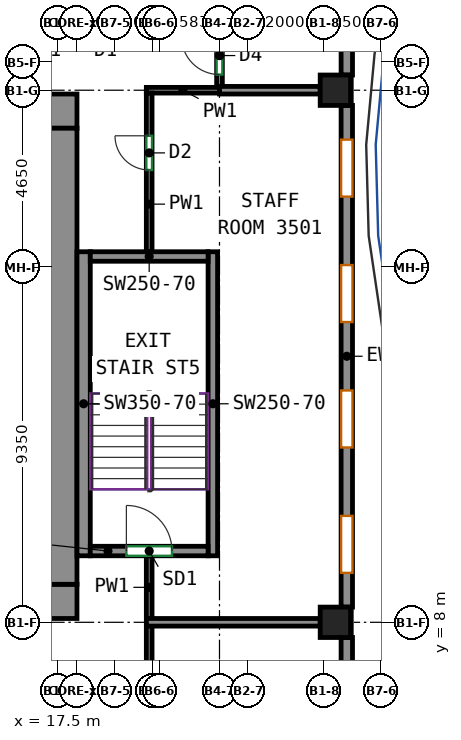
"""IFC4 building model, lengths in metres.
Left out: names, types, materials, properties, quantities, classifications, styles, units other than length and angle.
Written with IfcOpenShell. Run it as: python <this file> out.ifc"""

import sys

from ifc_helpers import new_model, si_unit, direction, frame, frame_2d, origin, origin_2d, place, context, subcontext, project, spatial, rectangle, extrude, source, transform, mapped, element, fill, save


model = new_model("IFC4")
c1 = context("Model", 3, precision=1e-05, world=origin(), true_north=direction((0.0, 1.0)))
c2 = subcontext(c1, "Body", "Model", "MODEL_VIEW")
j1 = project(units=[si_unit("LENGTHUNIT", "METRE"), si_unit("PLANEANGLEUNIT", "RADIAN")], contexts=[c1])
p1 = place(None, origin())
s1 = spatial("IfcSite", under=j1, at=p1, CompositionType="ELEMENT")
p2 = place(p1, origin())
s2 = spatial("IfcBuilding", under=s1, at=p2, CompositionType="ELEMENT")
p3 = place(p2, frame((0.0, 0.0, 154.1)))
s3 = spatial("IfcBuildingStorey", under=s2, at=p3, CompositionType="ELEMENT", Elevation=154.1)
m1 = source(origin(), c2, "Body", "SweptSolid", [
    extrude(rectangle(XDim=0.8, YDim=0.8, at=origin_2d()), origin(), (0.0, 0.0, 1.0), 3.12),
])
for number, where, z_axis, x_axis in (
    (1, (24.8, 8.0, 0.0), (0.0, 0.0, 1.0), (1.0, 0.0, 0.0)),
    (2, (24.8, 22.0, 0.0), (0.0, 0.0, 1.0), (1.0, 0.0, 0.0)),
):
    element("IfcColumn", number, at=place(p3, frame(where, z_axis=z_axis, x_axis=x_axis)), inside=s3, PredefinedType="COLUMN", context=c2, shape_type="MappedRepresentation", body=[
        mapped(m1, transform((0.0, 0.0, 0.0))),
    ])
m2 = source(origin(), c2, "Body", "SweptSolid", [
    extrude(rectangle(XDim=5.53, YDim=0.9, at=frame_2d((2.765, 0.0))), origin(), (0.0, 0.0, 1.0), 3.12),
])
p4 = place(p3, frame((12.47, 8.55, 0.0), z_axis=(0.0, 0.0, 1.0), x_axis=(1.0, 0.0, 0.0)))
e3 = element("IfcWall", 3, at=p4, inside=s3, PredefinedType="SHEAR", context=c2, shape_type="MappedRepresentation", body=[
    mapped(m2, transform((0.0, 0.0, 0.0))),
])
p5 = place(p4, frame((2.18, 0.0, 0.0)))
e4 = element("IfcOpeningElement", 4, at=p5, cuts=e3, PredefinedType="OPENING", context=c2, shape_type="SweptSolid", body=[
    extrude(rectangle(XDim=1.2, YDim=2.1, at=frame_2d((0.6, 1.05))), frame((0.0, 0.46, 0.0), z_axis=(0.0, -1.0, 0.0), x_axis=(1.0, 0.0, 0.0)), (0.0, 0.0, 1.0), 0.92),
])
m3 = source(origin(), c2, "Body", "SweptSolid", [
    extrude(rectangle(XDim=33.9, YDim=0.9, at=frame_2d((16.95, 0.0))), origin(), (0.0, 0.0, 1.0), 3.12),
])
p6 = place(p3, frame((-15.9, 21.45, 0.0), z_axis=(0.0, 0.0, 1.0), x_axis=(1.0, 0.0, 0.0)))
e5 = element("IfcWall", 5, at=p6, inside=s3, PredefinedType="SHEAR", context=c2, shape_type="MappedRepresentation", body=[
    mapped(m3, transform((0.0, 0.0, 0.0))),
])
p7 = place(p6, frame((6.008, 0.0, 0.0)))
e6 = element("IfcOpeningElement", 6, at=p7, cuts=e5, PredefinedType="OPENING", context=c2, shape_type="SweptSolid", body=[
    extrude(rectangle(XDim=0.9, YDim=2.1, at=frame_2d((0.45, 1.05))), frame((0.0, 0.46, 0.0), z_axis=(0.0, -1.0, 0.0), x_axis=(1.0, 0.0, 0.0)), (0.0, 0.0, 1.0), 0.92),
])
p8 = place(p6, frame((11.073, 0.0, 0.0)))
e7 = element("IfcOpeningElement", 7, at=p8, cuts=e5, PredefinedType="OPENING", context=c2, shape_type="SweptSolid", body=[
    extrude(rectangle(XDim=0.9, YDim=2.1, at=frame_2d((0.45, 1.05))), frame((0.0, 0.46, 0.0), z_axis=(0.0, -1.0, 0.0), x_axis=(1.0, 0.0, 0.0)), (0.0, 0.0, 1.0), 0.92),
])
p9 = place(p6, frame((16.205, 0.0, 0.0)))
e8 = element("IfcOpeningElement", 8, at=p9, cuts=e5, PredefinedType="OPENING", context=c2, shape_type="SweptSolid", body=[
    extrude(rectangle(XDim=0.9, YDim=2.1, at=frame_2d((0.45, 1.05))), frame((0.0, 0.46, 0.0), z_axis=(0.0, -1.0, 0.0), x_axis=(1.0, 0.0, 0.0)), (0.0, 0.0, 1.0), 0.92),
])
p10 = place(p6, frame((21.029, 0.0, 0.0)))
e9 = element("IfcOpeningElement", 9, at=p10, cuts=e5, PredefinedType="OPENING", context=c2, shape_type="SweptSolid", body=[
    extrude(rectangle(XDim=0.9, YDim=2.1, at=frame_2d((0.45, 1.05))), frame((0.0, 0.46, 0.0), z_axis=(0.0, -1.0, 0.0), x_axis=(1.0, 0.0, 0.0)), (0.0, 0.0, 1.0), 0.92),
])
p11 = place(p6, frame((26.389, 0.0, 0.0)))
e10 = element("IfcOpeningElement", 10, at=p11, cuts=e5, PredefinedType="OPENING", context=c2, shape_type="SweptSolid", body=[
    extrude(rectangle(XDim=0.9, YDim=2.1, at=frame_2d((0.45, 1.05))), frame((0.0, 0.46, 0.0), z_axis=(0.0, -1.0, 0.0), x_axis=(1.0, 0.0, 0.0)), (0.0, 0.0, 1.0), 0.92),
])
p12 = place(p6, frame((2.425, 0.0, 0.0)))
e11 = element("IfcOpeningElement", 11, at=p12, cuts=e5, PredefinedType="OPENING", context=c2, shape_type="SweptSolid", body=[
    extrude(rectangle(XDim=0.9, YDim=2.1, at=frame_2d((0.45, 1.05))), frame((0.0, 0.46, 0.0), z_axis=(0.0, -1.0, 0.0), x_axis=(1.0, 0.0, 0.0)), (0.0, 0.0, 1.0), 0.92),
])
p13 = place(p6, frame((30.575, 0.0, 0.0)))
e12 = element("IfcOpeningElement", 12, at=p13, cuts=e5, PredefinedType="OPENING", context=c2, shape_type="SweptSolid", body=[
    extrude(rectangle(XDim=0.9, YDim=2.1, at=frame_2d((0.45, 1.05))), frame((0.0, 0.46, 0.0), z_axis=(0.0, -1.0, 0.0), x_axis=(1.0, 0.0, 0.0)), (0.0, 0.0, 1.0), 0.92),
])
m4 = source(origin(), c2, "Body", "SweptSolid", [
    extrude(rectangle(XDim=12.0, YDim=0.9, at=frame_2d((6.0, 0.0))), origin(), (0.0, 0.0, 1.0), 3.12),
])
p14 = place(p3, frame((17.55, 9.0, 0.0), z_axis=(0.0, 0.0, 1.0), x_axis=(0.0, 1.0, 0.0)))
e13 = element("IfcWall", 13, at=p14, inside=s3, PredefinedType="SHEAR", context=c2, shape_type="MappedRepresentation", body=[
    mapped(m4, transform((0.0, 0.0, 0.0))),
])
m5 = source(origin(), c2, "Body", "SweptSolid", [
    extrude(rectangle(XDim=8.0, YDim=0.35, at=frame_2d((4.0, 0.0))), origin(), (0.0, 0.0, 1.0), 3.12),
])
p15 = place(p3, frame((18.175, 9.75, 0.0), z_axis=(0.0, 0.0, 1.0), x_axis=(0.0, 1.0, 0.0)))
e14 = element("IfcWall", 14, at=p15, inside=s3, PredefinedType="SHEAR", context=c2, shape_type="MappedRepresentation", body=[
    mapped(m5, transform((0.0, 0.0, 0.0))),
])
m6 = source(origin(), c2, "Body", "SweptSolid", [
    extrude(rectangle(XDim=8.0, YDim=0.25, at=frame_2d((4.0, 0.0))), origin(), (0.0, 0.0, 1.0), 3.12),
])
p16 = place(p3, frame((21.575, 9.75, 0.0), z_axis=(0.0, 0.0, 1.0), x_axis=(0.0, 1.0, 0.0)))
e15 = element("IfcWall", 15, at=p16, inside=s3, PredefinedType="SHEAR", context=c2, shape_type="MappedRepresentation", body=[
    mapped(m6, transform((0.0, 0.0, 0.0))),
])
m7 = source(origin(), c2, "Body", "SweptSolid", [
    extrude(rectangle(XDim=3.1, YDim=0.25, at=frame_2d((1.55, 0.0))), origin(), (0.0, 0.0, 1.0), 3.12),
])
p17 = place(p3, frame((18.35, 9.875, 0.0), z_axis=(0.0, 0.0, 1.0), x_axis=(1.0, 0.0, 0.0)))
e16 = element("IfcWall", 16, at=p17, inside=s3, PredefinedType="SHEAR", context=c2, shape_type="MappedRepresentation", body=[
    mapped(m7, transform((0.0, 0.0, 0.0))),
])
p18 = place(p17, frame((0.95, 0.0, 0.0)))
e17 = element("IfcOpeningElement", 17, at=p18, cuts=e16, PredefinedType="OPENING", context=c2, shape_type="SweptSolid", body=[
    extrude(rectangle(XDim=1.2, YDim=2.1, at=frame_2d((0.6, 1.05))), frame((0.0, 0.135, 0.0), z_axis=(0.0, -1.0, 0.0), x_axis=(1.0, 0.0, 0.0)), (0.0, 0.0, 1.0), 0.27),
])
p19 = place(p3, frame((18.35, 17.625, 0.0), z_axis=(0.0, 0.0, 1.0), x_axis=(1.0, 0.0, 0.0)))
e18 = element("IfcWall", 18, at=p19, inside=s3, PredefinedType="SHEAR", context=c2, shape_type="MappedRepresentation", body=[
    mapped(m7, transform((0.0, 0.0, 0.0))),
])
m8 = source(origin(), c2, "Body", "SweptSolid", [
    extrude(rectangle(XDim=6.513, YDim=0.3, at=frame_2d((3.256, 0.0))), origin(), (0.0, 0.0, 1.0), 3.12),
])
p20 = place(p3, frame((25.1, 1.087, 0.0), z_axis=(0.0, 0.0, 1.0), x_axis=(0.0, 1.0, 0.0)))
e19 = element("IfcWall", 19, at=p20, inside=s3, PredefinedType="SOLIDWALL", context=c2, shape_type="MappedRepresentation", body=[
    mapped(m8, transform((0.0, 0.0, 0.0))),
])
p21 = place(p20, frame((0.878, 0.0, 0.85)))
e20 = element("IfcOpeningElement", 20, at=p21, cuts=e19, PredefinedType="OPENING", context=c2, shape_type="SweptSolid", body=[
    extrude(rectangle(XDim=1.5, YDim=1.95, at=frame_2d((0.75, 0.975))), frame((0.0, 0.16, 0.0), z_axis=(0.0, -1.0, 0.0), x_axis=(1.0, 0.0, 0.0)), (0.0, 0.0, 1.0), 0.32),
])
p22 = place(p20, frame((4.135, 0.0, 0.85)))
e21 = element("IfcOpeningElement", 21, at=p22, cuts=e19, PredefinedType="OPENING", context=c2, shape_type="SweptSolid", body=[
    extrude(rectangle(XDim=1.5, YDim=1.95, at=frame_2d((0.75, 0.975))), frame((0.0, 0.16, 0.0), z_axis=(0.0, -1.0, 0.0), x_axis=(1.0, 0.0, 0.0)), (0.0, 0.0, 1.0), 0.32),
])
m9 = source(origin(), c2, "Body", "SweptSolid", [
    extrude(rectangle(XDim=13.2, YDim=0.3, at=frame_2d((6.6, 0.0))), origin(), (0.0, 0.0, 1.0), 3.12),
])
p23 = place(p3, frame((25.1, 8.4, 0.0), z_axis=(0.0, 0.0, 1.0), x_axis=(0.0, 1.0, 0.0)))
e22 = element("IfcWall", 22, at=p23, inside=s3, PredefinedType="SOLIDWALL", context=c2, shape_type="MappedRepresentation", body=[
    mapped(m9, transform((0.0, 0.0, 0.0))),
])
p24 = place(p23, frame((0.9, 0.0, 0.85)))
e23 = element("IfcOpeningElement", 23, at=p24, cuts=e22, PredefinedType="OPENING", context=c2, shape_type="SweptSolid", body=[
    extrude(rectangle(XDim=1.5, YDim=1.95, at=frame_2d((0.75, 0.975))), frame((0.0, 0.16, 0.0), z_axis=(0.0, -1.0, 0.0), x_axis=(1.0, 0.0, 0.0)), (0.0, 0.0, 1.0), 0.32),
])
p25 = place(p23, frame((4.2, 0.0, 0.85)))
e24 = element("IfcOpeningElement", 24, at=p25, cuts=e22, PredefinedType="OPENING", context=c2, shape_type="SweptSolid", body=[
    extrude(rectangle(XDim=1.5, YDim=1.95, at=frame_2d((0.75, 0.975))), frame((0.0, 0.16, 0.0), z_axis=(0.0, -1.0, 0.0), x_axis=(1.0, 0.0, 0.0)), (0.0, 0.0, 1.0), 0.32),
])
p26 = place(p23, frame((7.5, 0.0, 0.85)))
e25 = element("IfcOpeningElement", 25, at=p26, cuts=e22, PredefinedType="OPENING", context=c2, shape_type="SweptSolid", body=[
    extrude(rectangle(XDim=1.5, YDim=1.95, at=frame_2d((0.75, 0.975))), frame((0.0, 0.16, 0.0), z_axis=(0.0, -1.0, 0.0), x_axis=(1.0, 0.0, 0.0)), (0.0, 0.0, 1.0), 0.32),
])
p27 = place(p23, frame((10.8, 0.0, 0.85)))
e26 = element("IfcOpeningElement", 26, at=p27, cuts=e22, PredefinedType="OPENING", context=c2, shape_type="SweptSolid", body=[
    extrude(rectangle(XDim=1.5, YDim=1.95, at=frame_2d((0.75, 0.975))), frame((0.0, 0.16, 0.0), z_axis=(0.0, -1.0, 0.0), x_axis=(1.0, 0.0, 0.0)), (0.0, 0.0, 1.0), 0.32),
])
m10 = source(origin(), c2, "Body", "SweptSolid", [
    extrude(rectangle(XDim=4.95, YDim=0.3, at=frame_2d((2.475, 0.0))), origin(), (0.0, 0.0, 1.0), 3.12),
])
p28 = place(p3, frame((25.1, 22.4, 0.0), z_axis=(0.0, 0.0, 1.0), x_axis=(0.0, 1.0, 0.0)))
e27 = element("IfcWall", 27, at=p28, inside=s3, PredefinedType="SOLIDWALL", context=c2, shape_type="MappedRepresentation", body=[
    mapped(m10, transform((0.0, 0.0, 0.0))),
])
p29 = place(p28, frame((1.75, 0.0, 0.85)))
e28 = element("IfcOpeningElement", 28, at=p29, cuts=e27, PredefinedType="OPENING", context=c2, shape_type="SweptSolid", body=[
    extrude(rectangle(XDim=1.5, YDim=1.95, at=frame_2d((0.75, 0.975))), frame((0.0, 0.16, 0.0), z_axis=(0.0, -1.0, 0.0), x_axis=(1.0, 0.0, 0.0)), (0.0, 0.0, 1.0), 0.32),
])
p30 = place(p3, frame((21.75, 22.1, 0.0), z_axis=(0.0, 0.0, 1.0), x_axis=(0.0, 1.0, 0.0)))
e29 = element("IfcWall", 29, at=p30, inside=s3, PredefinedType="PARTITIONING", context=c2, shape_type="SweptSolid", body=[
    extrude(rectangle(XDim=1.625, YDim=0.15, at=frame_2d((0.812, 0.0))), origin(), (0.0, 0.0, 1.0), 3.12),
])
p31 = place(p30, frame((0.312, 0.0, 0.0)))
e30 = element("IfcOpeningElement", 30, at=p31, cuts=e29, PredefinedType="OPENING", context=c2, shape_type="SweptSolid", body=[
    extrude(rectangle(XDim=1.0, YDim=2.1, at=frame_2d((0.5, 1.05))), frame((0.0, 0.085, 0.0), z_axis=(0.0, -1.0, 0.0), x_axis=(1.0, 0.0, 0.0)), (0.0, 0.0, 1.0), 0.17),
])
p32 = place(p3, frame((19.9, 4.434, 0.0), z_axis=(0.0, 0.0, 1.0), x_axis=(0.0, 1.0, 0.0)))
e31 = element("IfcWall", 31, at=p32, inside=s3, PredefinedType="PARTITIONING", context=c2, shape_type="SweptSolid", body=[
    extrude(rectangle(XDim=3.476, YDim=0.15, at=frame_2d((1.738, 0.0))), origin(), (0.0, 0.0, 1.0), 3.12),
])
p33 = place(p32, frame((1.236, 0.0, 0.0)))
e32 = element("IfcOpeningElement", 32, at=p33, cuts=e31, PredefinedType="OPENING", context=c2, shape_type="SweptSolid", body=[
    extrude(rectangle(XDim=0.9, YDim=2.1, at=frame_2d((0.45, 1.05))), frame((0.0, 0.085, 0.0), z_axis=(0.0, -1.0, 0.0), x_axis=(1.0, 0.0, 0.0)), (0.0, 0.0, 1.0), 0.17),
])
p34 = place(p3, frame((19.825, 22.0, 0.0), z_axis=(0.0, 0.0, 1.0), x_axis=(1.0, 0.0, 0.0)))
e33 = element("IfcWall", 33, at=p34, inside=s3, PredefinedType="PARTITIONING", context=c2, shape_type="SweptSolid", body=[
    extrude(rectangle(XDim=1.925, YDim=0.15, at=frame_2d((0.962, 0.0))), origin(), (0.0, 0.0, 1.0), 3.12),
])
p35 = place(p3, frame((19.9, 17.75, 0.0), z_axis=(0.0, 0.0, 1.0), x_axis=(0.0, 1.0, 0.0)))
e34 = element("IfcWall", 34, at=p35, inside=s3, PredefinedType="PARTITIONING", context=c2, shape_type="SweptSolid", body=[
    extrude(rectangle(XDim=4.175, YDim=0.15, at=frame_2d((2.087, 0.0))), origin(), (0.0, 0.0, 1.0), 3.12),
])
p36 = place(p35, frame((2.151, 0.0, 0.0)))
e35 = element("IfcOpeningElement", 35, at=p36, cuts=e34, PredefinedType="OPENING", context=c2, shape_type="SweptSolid", body=[
    extrude(rectangle(XDim=0.9, YDim=2.1, at=frame_2d((0.45, 1.05))), frame((0.0, 0.085, 0.0), z_axis=(0.0, -1.0, 0.0), x_axis=(1.0, 0.0, 0.0)), (0.0, 0.0, 1.0), 0.17),
])
p37 = place(p3, frame((19.9, 8.09, 0.0), z_axis=(0.0, 0.0, 1.0), x_axis=(0.0, 1.0, 0.0)))
e36 = element("IfcWall", 36, at=p37, inside=s3, PredefinedType="PARTITIONING", context=c2, shape_type="SweptSolid", body=[
    extrude(rectangle(XDim=1.66, YDim=0.15, at=frame_2d((0.83, 0.0))), origin(), (0.0, 0.0, 1.0), 3.12),
])
p38 = place(p3, frame((21.752, 22.0, 0.0), z_axis=(0.0, 0.0, 1.0), x_axis=(1.0, 0.0, 0.0)))
e37 = element("IfcWall", 37, at=p38, inside=s3, PredefinedType="PARTITIONING", context=c2, shape_type="SweptSolid", body=[
    extrude(rectangle(XDim=2.648, YDim=0.2, at=frame_2d((1.324, 0.0))), origin(), (0.0, 0.0, 1.0), 3.12),
])
p39 = place(p3, frame((19.827, 8.0, 0.0), z_axis=(0.0, 0.0, 1.0), x_axis=(1.0, 0.0, 0.0)))
e38 = element("IfcWall", 38, at=p39, inside=s3, PredefinedType="PARTITIONING", context=c2, shape_type="SweptSolid", body=[
    extrude(rectangle(XDim=4.573, YDim=0.2, at=frame_2d((2.287, 0.0))), origin(), (0.0, 0.0, 1.0), 3.12),
])
p40 = place(p24, origin())
e39 = element("IfcWindow", 39, at=p40, inside=s3, PartitioningType="SINGLE_PANEL", PredefinedType="WINDOW", context=c2, shape_type="SweptSolid", body=[
    extrude(rectangle(XDim=1.5, YDim=1.95, at=frame_2d((0.75, 0.975))), frame((0.0, 0.03, 0.0), z_axis=(0.0, -1.0, 0.0), x_axis=(1.0, 0.0, 0.0)), (0.0, 0.0, 1.0), 0.06),
])
fill(e23, e39)
p41 = place(p25, origin())
e40 = element("IfcWindow", 40, at=p41, inside=s3, PartitioningType="SINGLE_PANEL", PredefinedType="WINDOW", context=c2, shape_type="SweptSolid", body=[
    extrude(rectangle(XDim=1.5, YDim=1.95, at=frame_2d((0.75, 0.975))), frame((0.0, 0.03, 0.0), z_axis=(0.0, -1.0, 0.0), x_axis=(1.0, 0.0, 0.0)), (0.0, 0.0, 1.0), 0.06),
])
fill(e24, e40)
p42 = place(p26, origin())
e41 = element("IfcWindow", 41, at=p42, inside=s3, PartitioningType="SINGLE_PANEL", PredefinedType="WINDOW", context=c2, shape_type="SweptSolid", body=[
    extrude(rectangle(XDim=1.5, YDim=1.95, at=frame_2d((0.75, 0.975))), frame((0.0, 0.03, 0.0), z_axis=(0.0, -1.0, 0.0), x_axis=(1.0, 0.0, 0.0)), (0.0, 0.0, 1.0), 0.06),
])
fill(e25, e41)
p43 = place(p27, origin())
e42 = element("IfcWindow", 42, at=p43, inside=s3, PartitioningType="SINGLE_PANEL", PredefinedType="WINDOW", context=c2, shape_type="SweptSolid", body=[
    extrude(rectangle(XDim=1.5, YDim=1.95, at=frame_2d((0.75, 0.975))), frame((0.0, 0.03, 0.0), z_axis=(0.0, -1.0, 0.0), x_axis=(1.0, 0.0, 0.0)), (0.0, 0.0, 1.0), 0.06),
])
fill(e26, e42)
p44 = place(p18, origin())
e43 = element("IfcDoor", 43, at=p44, inside=s3, OperationType="DOUBLE_DOOR_SINGLE_SWING", PredefinedType="DOOR", context=c2, shape_type="SweptSolid", body=[
    extrude(rectangle(XDim=1.2, YDim=2.1, at=frame_2d((0.6, 1.05))), frame((0.0, 0.025, 0.0), z_axis=(0.0, -1.0, 0.0), x_axis=(1.0, 0.0, 0.0)), (0.0, 0.0, 1.0), 0.05),
])
fill(e17, e43)
p45 = place(p36, origin())
e44 = element("IfcDoor", 44, at=p45, inside=s3, OperationType="SINGLE_SWING_RIGHT", PredefinedType="DOOR", context=c2, shape_type="SweptSolid", body=[
    extrude(rectangle(XDim=0.9, YDim=2.1, at=frame_2d((0.45, 1.05))), frame((0.0, 0.025, 0.0), z_axis=(0.0, -1.0, 0.0), x_axis=(1.0, 0.0, 0.0)), (0.0, 0.0, 1.0), 0.05),
])
fill(e35, e44)
p46 = place(p31, origin())
e45 = element("IfcDoor", 45, at=p46, inside=s3, OperationType="SINGLE_SWING_RIGHT", PredefinedType="DOOR", context=c2, shape_type="SweptSolid", body=[
    extrude(rectangle(XDim=1.0, YDim=2.1, at=frame_2d((0.5, 1.05))), frame((0.0, 0.025, 0.0), z_axis=(0.0, -1.0, 0.0), x_axis=(1.0, 0.0, 0.0)), (0.0, 0.0, 1.0), 0.05),
])
fill(e30, e45)
save(model, sys.argv[1])
